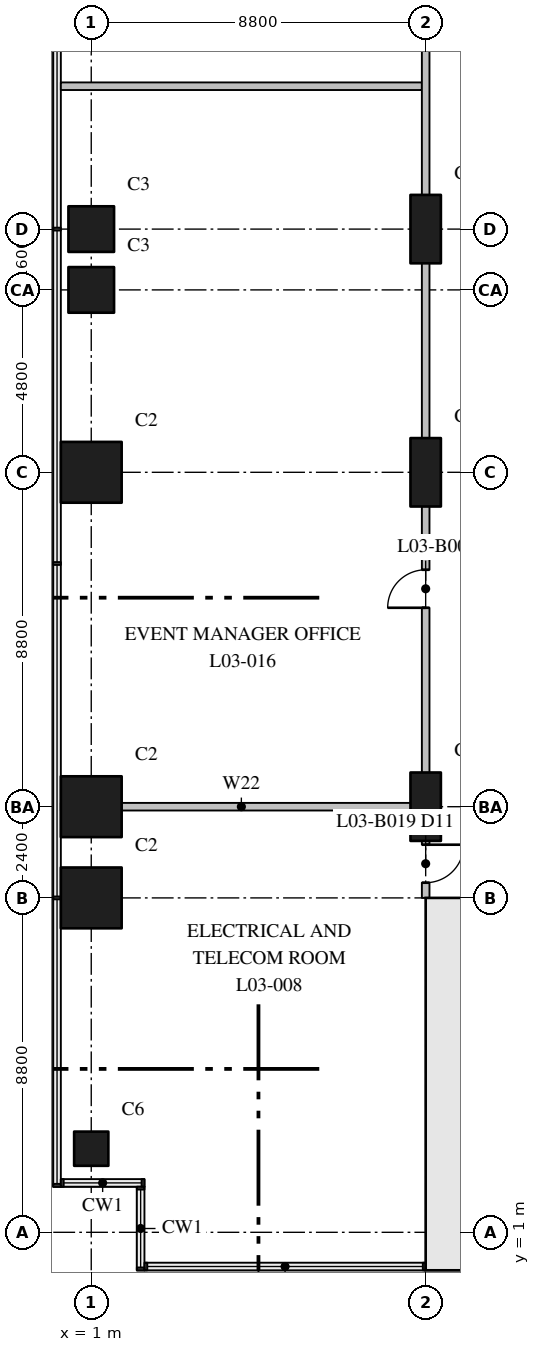
"""IFC4 building model, lengths in metres.
Left out: names, types, materials, properties, quantities, classifications, styles, units other than length and angle.
Written with IfcOpenShell. Run it as: python <this file> out.ifc"""

import sys

from ifc_helpers import new_model, si_unit, direction, frame, frame_2d, origin, origin_2d, place, context, subcontext, project, spatial, rectangle, extrude, element, fill, save


model = new_model("IFC4")
c1 = context("Model", 3, precision=1e-05, world=origin(), true_north=direction((0.0, 1.0)))
c2 = subcontext(c1, "Body", "Model", "MODEL_VIEW")
j1 = project(units=[si_unit("LENGTHUNIT", "METRE"), si_unit("PLANEANGLEUNIT", "RADIAN")], contexts=[c1])
p1 = place(None, origin())
s1 = spatial("IfcSite", under=j1, at=p1, CompositionType="ELEMENT")
p2 = place(p1, origin())
s2 = spatial("IfcBuilding", under=s1, at=p2, CompositionType="ELEMENT")
p3 = place(p2, frame((0.0, 0.0, 18.0)))
s3 = spatial("IfcBuildingStorey", under=s2, at=p3, CompositionType="ELEMENT", Elevation=18.0)
p4 = place(p3, frame((1.0, 3.2, 0.0), z_axis=(0.0, 0.0, 1.0), x_axis=(1.0, 0.0, 0.0)))
e1 = element("IfcColumn", 1, at=p4, inside=s3, PredefinedType="COLUMN", context=c2, shape_type="SweptSolid", body=[
    extrude(rectangle(XDim=0.9, YDim=0.9, at=origin_2d()), origin(), (0.0, 0.0, 1.0), 5.5),
])
for number, where, z_axis, x_axis in (
    (2, (1.0, 9.8, 0.0), (0.0, 0.0, 1.0), (1.0, 0.0, 0.0)),
    (3, (1.0, 12.2, 0.0), (0.0, 0.0, 1.0), (1.0, 0.0, 0.0)),
    (4, (1.0, 21.0, 0.0), (0.0, 0.0, 1.0), (1.0, 0.0, 0.0)),
):
    element("IfcColumn", number, at=place(p3, frame(where, z_axis=z_axis, x_axis=x_axis)), inside=s3, PredefinedType="COLUMN", context=c2, shape_type="SweptSolid", body=[
        extrude(rectangle(XDim=1.6, YDim=1.6, at=origin_2d()), origin(), (0.0, 0.0, 1.0), 5.5),
    ])
for number, where, z_axis, x_axis in (
    (5, (1.0, 25.8, 0.0), (0.0, 0.0, 1.0), (1.0, 0.0, 0.0)),
    (6, (1.0, 27.4, 0.0), (0.0, 0.0, 1.0), (1.0, 0.0, 0.0)),
):
    element("IfcColumn", number, at=place(p3, frame(where, z_axis=z_axis, x_axis=x_axis)), inside=s3, PredefinedType="COLUMN", context=c2, shape_type="SweptSolid", body=[
        extrude(rectangle(XDim=1.2, YDim=1.2, at=origin_2d()), origin(), (0.0, 0.0, 1.0), 5.5),
    ])
for number, where, z_axis, x_axis in (
    (7, (9.8, 12.2, 0.0), (0.0, 0.0, 1.0), (0.0, 1.0, 0.0)),
    (8, (9.8, 21.0, 0.0), (0.0, 0.0, 1.0), (0.0, 1.0, 0.0)),
    (9, (9.8, 27.4, 0.0), (0.0, 0.0, 1.0), (0.0, 1.0, 0.0)),
):
    element("IfcColumn", number, at=place(p3, frame(where, z_axis=z_axis, x_axis=x_axis)), inside=s3, PredefinedType="COLUMN", context=c2, shape_type="SweptSolid", body=[
        extrude(rectangle(XDim=1.8, YDim=0.8, at=origin_2d()), origin(), (0.0, 0.0, 1.0), 5.5),
    ])
p5 = place(p3, frame((9.8, 0.6, 0.0), z_axis=(0.0, 0.0, 1.0), x_axis=(1.0, 0.0, 0.0)))
e10 = element("IfcWall", 10, at=p5, inside=s3, PredefinedType="SHEAR", context=c2, shape_type="SweptSolid", body=[
    extrude(rectangle(XDim=35.2, YDim=1.2, at=frame_2d((17.6, 0.0))), origin(), (0.0, 0.0, 1.0), 5.5),
])
p6 = place(p3, frame((10.4, 1.2, 0.0), z_axis=(0.0, 0.0, 1.0), x_axis=(0.0, 1.0, 0.0)))
e11 = element("IfcWall", 11, at=p6, inside=s3, PredefinedType="SHEAR", context=c2, shape_type="SweptSolid", body=[
    extrude(rectangle(XDim=8.6, YDim=1.2, at=frame_2d((4.3, 0.0))), origin(), (0.0, 0.0, 1.0), 5.5),
])
p7 = place(p3, frame((9.8, 9.6, 0.0), z_axis=(0.0, 0.0, 1.0), x_axis=(1.0, 0.0, 0.0)))
e12 = element("IfcWall", 12, at=p7, inside=s3, PredefinedType="SHEAR", context=c2, shape_type="SweptSolid", body=[
    extrude(rectangle(XDim=4.3, YDim=0.4, at=frame_2d((2.15, 0.0))), origin(), (0.0, 0.0, 1.0), 5.5),
])
p8 = place(p7, frame((2.05, 0.0, 0.0)))
e13 = element("IfcOpeningElement", 13, at=p8, cuts=e12, PredefinedType="OPENING", context=c2, shape_type="SweptSolid", body=[
    extrude(rectangle(XDim=1.2, YDim=2.1, at=frame_2d((0.6, 1.05))), frame((0.0, 0.21, 0.0), z_axis=(0.0, -1.0, 0.0), x_axis=(1.0, 0.0, 0.0)), (0.0, 0.0, 1.0), 0.42),
])
for number, where, z_axis, x_axis in (
    (14, (0.2, 12.2, 0.0), (0.0, 0.0, 1.0), (1.0, 0.0, 0.0)),
    (15, (0.2, 31.16, 0.0), (0.0, 0.0, 1.0), (1.0, 0.0, 0.0)),
):
    element("IfcWall", number, at=place(p3, frame(where, z_axis=z_axis, x_axis=x_axis)), inside=s3, PredefinedType="PARTITIONING", context=c2, shape_type="SweptSolid", body=[
        extrude(rectangle(XDim=9.5, YDim=0.2, at=frame_2d((4.75, 0.0))), origin(), (0.0, 0.0, 1.0), 5.1),
    ])
p9 = place(p3, frame((9.8, 9.8, 0.0), z_axis=(0.0, 0.0, 1.0), x_axis=(0.0, 1.0, 0.0)))
e16 = element("IfcWall", 16, at=p9, inside=s3, PredefinedType="PARTITIONING", context=c2, shape_type="SweptSolid", body=[
    extrude(rectangle(XDim=48.0, YDim=0.2, at=frame_2d((24.0, 0.0))), origin(), (0.0, 0.0, 1.0), 5.1),
])
p10 = place(p9, frame((7.635, 0.0, 0.0)))
e17 = element("IfcOpeningElement", 17, at=p10, cuts=e16, PredefinedType="OPENING", context=c2, shape_type="SweptSolid", body=[
    extrude(rectangle(XDim=1.0, YDim=2.1, at=frame_2d((0.5, 1.05))), frame((0.0, 0.11, 0.0), z_axis=(0.0, -1.0, 0.0), x_axis=(1.0, 0.0, 0.0)), (0.0, 0.0, 1.0), 0.22),
])
p11 = place(p9, frame((27.335, 0.0, 0.0)))
e18 = element("IfcOpeningElement", 18, at=p11, cuts=e16, PredefinedType="OPENING", context=c2, shape_type="SweptSolid", body=[
    extrude(rectangle(XDim=1.0, YDim=2.1, at=frame_2d((0.5, 1.05))), frame((0.0, 0.11, 0.0), z_axis=(0.0, -1.0, 0.0), x_axis=(1.0, 0.0, 0.0)), (0.0, 0.0, 1.0), 0.22),
])
p12 = place(p9, frame((33.28, 0.0, 0.0)))
e19 = element("IfcOpeningElement", 19, at=p12, cuts=e16, PredefinedType="OPENING", context=c2, shape_type="SweptSolid", body=[
    extrude(rectangle(XDim=1.0, YDim=2.1, at=frame_2d((0.5, 1.05))), frame((0.0, 0.11, 0.0), z_axis=(0.0, -1.0, 0.0), x_axis=(1.0, 0.0, 0.0)), (0.0, 0.0, 1.0), 0.22),
])
p13 = place(p9, frame((39.825, 0.0, 0.0)))
e20 = element("IfcOpeningElement", 20, at=p13, cuts=e16, PredefinedType="OPENING", context=c2, shape_type="SweptSolid", body=[
    extrude(rectangle(XDim=1.0, YDim=2.1, at=frame_2d((0.5, 1.05))), frame((0.0, 0.11, 0.0), z_axis=(0.0, -1.0, 0.0), x_axis=(1.0, 0.0, 0.0)), (0.0, 0.0, 1.0), 0.22),
])
p14 = place(p9, frame((44.967, 0.0, 0.0)))
e21 = element("IfcOpeningElement", 21, at=p14, cuts=e16, PredefinedType="OPENING", context=c2, shape_type="SweptSolid", body=[
    extrude(rectangle(XDim=1.0, YDim=2.1, at=frame_2d((0.5, 1.05))), frame((0.0, 0.11, 0.0), z_axis=(0.0, -1.0, 0.0), x_axis=(1.0, 0.0, 0.0)), (0.0, 0.0, 1.0), 0.22),
])
p15 = place(p9, frame((0.4, 0.0, 0.0)))
e22 = element("IfcOpeningElement", 22, at=p15, cuts=e16, PredefinedType="OPENING", context=c2, shape_type="SweptSolid", body=[
    extrude(rectangle(XDim=1.0, YDim=2.1, at=frame_2d((0.5, 1.05))), frame((0.0, 0.11, 0.0), z_axis=(0.0, -1.0, 0.0), x_axis=(1.0, 0.0, 0.0)), (0.0, 0.0, 1.0), 0.22),
])
p16 = place(p10, origin())
e23 = element("IfcDoor", 23, at=p16, inside=s3, OperationType="SINGLE_SWING_LEFT", PredefinedType="DOOR", context=c2, shape_type="SweptSolid", body=[
    extrude(rectangle(XDim=1.0, YDim=2.1, at=frame_2d((0.5, 1.05))), frame((0.0, 0.025, 0.0), z_axis=(0.0, -1.0, 0.0), x_axis=(1.0, 0.0, 0.0)), (0.0, 0.0, 1.0), 0.05),
])
fill(e17, e23)
p17 = place(p15, frame((1.0, 0.0, 0.0), z_axis=(0.0, 0.0, 1.0), x_axis=(-1.0, 0.0, 0.0)))
e24 = element("IfcDoor", 24, at=p17, inside=s3, OperationType="SINGLE_SWING_RIGHT", PredefinedType="DOOR", context=c2, shape_type="SweptSolid", body=[
    extrude(rectangle(XDim=1.0, YDim=2.1, at=frame_2d((0.5, 1.05))), frame((0.0, 0.025, 0.0), z_axis=(0.0, -1.0, 0.0), x_axis=(1.0, 0.0, 0.0)), (0.0, 0.0, 1.0), 0.05),
])
fill(e22, e24)
save(model, sys.argv[1])
